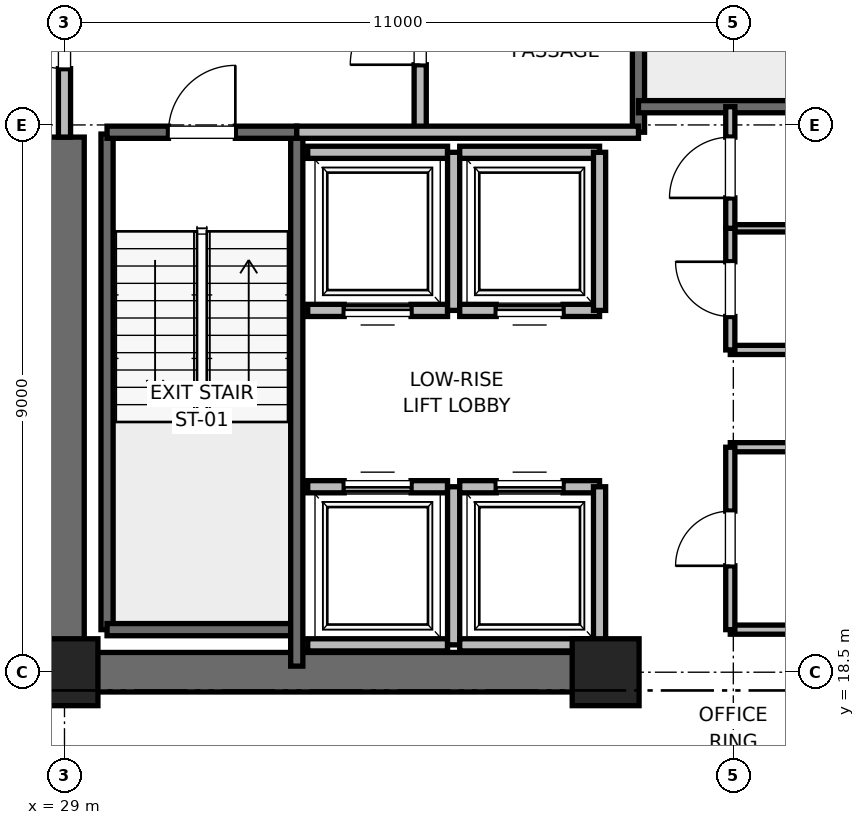
"""IFC4 building model, lengths in metres.
Left out: names, types, materials, properties, quantities, classifications, styles, units other than length and angle.
Written with IfcOpenShell. Run it as: python <this file> out.ifc"""

import sys

from ifc_helpers import new_model, si_unit, direction, frame, frame_2d, origin, origin_2d, place, context, subcontext, project, spatial, rectangle, extrude, element, fill, save


model = new_model("IFC4")
c1 = context("Model", 3, precision=1e-05, world=origin(), true_north=direction((0.0, 1.0)))
c2 = subcontext(c1, "Body", "Model", "MODEL_VIEW")
j1 = project(units=[si_unit("LENGTHUNIT", "METRE"), si_unit("PLANEANGLEUNIT", "RADIAN")], contexts=[c1])
p1 = place(None, origin())
s1 = spatial("IfcSite", under=j1, at=p1, CompositionType="ELEMENT")
p2 = place(p1, origin())
s2 = spatial("IfcBuilding", under=s1, at=p2, CompositionType="ELEMENT")
p3 = place(p2, frame((0.0, 0.0, 51.6)))
s3 = spatial("IfcBuildingStorey", under=s2, at=p3, CompositionType="ELEMENT", Elevation=51.6)
for number, where, z_axis, x_axis in (
    (1, (29.0, 18.5, 0.0), (0.0, 0.0, 1.0), (1.0, 0.0, 0.0)),
    (2, (37.9, 18.5, 0.0), (0.0, 0.0, 1.0), (1.0, 0.0, 0.0)),
):
    element("IfcColumn", number, at=place(p3, frame(where, z_axis=z_axis, x_axis=x_axis)), inside=s3, PredefinedType="PILASTER", context=c2, shape_type="SweptSolid", body=[
        extrude(rectangle(XDim=1.1, YDim=1.1, at=origin_2d()), origin(), (0.0, 0.0, 1.0), 4.0),
    ])
p4 = place(p3, frame((29.0, 18.5, 0.0), z_axis=(0.0, 0.0, 1.0), x_axis=(1.0, 0.0, 0.0)))
e3 = element("IfcWall", 3, at=p4, inside=s3, PredefinedType="SHEAR", context=c2, shape_type="SweptSolid", body=[
    extrude(rectangle(XDim=9.2, YDim=0.65, at=frame_2d((4.6, 0.0))), origin(), (0.0, 0.0, 1.0), 3.76),
])
p5 = place(p3, frame((29.0, 18.5, 0.0), z_axis=(0.0, 0.0, 1.0), x_axis=(0.0, 1.0, 0.0)))
e4 = element("IfcWall", 4, at=p5, inside=s3, PredefinedType="SHEAR", context=c2, shape_type="SweptSolid", body=[
    extrude(rectangle(XDim=8.8, YDim=0.65, at=frame_2d((4.4, 0.0))), origin(), (0.0, 0.0, 1.0), 3.76),
])
p6 = place(p3, frame((29.7, 19.2, 0.0), z_axis=(0.0, 0.0, 1.0), x_axis=(0.0, 1.0, 0.0)))
e5 = element("IfcWall", 5, at=p6, inside=s3, PredefinedType="SOLIDWALL", context=c2, shape_type="SweptSolid", body=[
    extrude(rectangle(XDim=8.15, YDim=0.2, at=frame_2d((4.075, 0.0))), origin(), (0.0, 0.0, 1.0), 3.76),
])
p7 = place(p3, frame((29.7, 19.2, 0.0), z_axis=(0.0, 0.0, 1.0), x_axis=(1.0, 0.0, 0.0)))
e6 = element("IfcWall", 6, at=p7, inside=s3, PredefinedType="SOLIDWALL", context=c2, shape_type="SweptSolid", body=[
    extrude(rectangle(XDim=3.12, YDim=0.2, at=frame_2d((1.56, 0.0))), origin(), (0.0, 0.0, 1.0), 3.76),
])
p8 = place(p3, frame((32.82, 18.6, 0.0), z_axis=(0.0, 0.0, 1.0), x_axis=(0.0, 1.0, 0.0)))
e7 = element("IfcWall", 7, at=p8, inside=s3, PredefinedType="SOLIDWALL", context=c2, shape_type="SweptSolid", body=[
    extrude(rectangle(XDim=8.78, YDim=0.2, at=frame_2d((4.39, 0.0))), origin(), (0.0, 0.0, 1.0), 3.76),
])
p9 = place(p3, frame((29.7, 27.38, 0.0), z_axis=(0.0, 0.0, 1.0), x_axis=(1.0, 0.0, 0.0)))
e8 = element("IfcWall", 8, at=p9, inside=s3, PredefinedType="SOLIDWALL", context=c2, shape_type="SweptSolid", body=[
    extrude(rectangle(XDim=3.12, YDim=0.2, at=frame_2d((1.56, 0.0))), origin(), (0.0, 0.0, 1.0), 3.76),
])
p10 = place(p9, frame((1.01, 0.0, 0.0)))
e9 = element("IfcOpeningElement", 9, at=p10, cuts=e8, PredefinedType="OPENING", context=c2, shape_type="SweptSolid", body=[
    extrude(rectangle(XDim=1.1, YDim=2.15, at=frame_2d((0.55, 1.075))), frame((0.0, 0.1, 0.0), z_axis=(0.0, -1.0, 0.0), x_axis=(1.0, 0.0, 0.0)), (0.0, 0.0, 1.0), 0.2),
])
p11 = place(p3, frame((38.44, 27.38, 0.0), z_axis=(0.0, 0.0, 1.0), x_axis=(0.0, 1.0, 0.0)))
e10 = element("IfcWall", 10, at=p11, inside=s3, PredefinedType="SOLIDWALL", context=c2, shape_type="SweptSolid", body=[
    extrude(rectangle(XDim=8.87, YDim=0.2, at=frame_2d((4.435, 0.0))), origin(), (0.0, 0.0, 1.0), 3.76),
])
p12 = place(p3, frame((38.44, 27.8, 0.0), z_axis=(0.0, 0.0, 1.0), x_axis=(1.0, 0.0, 0.0)))
e11 = element("IfcWall", 11, at=p12, inside=s3, PredefinedType="SOLIDWALL", context=c2, shape_type="SweptSolid", body=[
    extrude(rectangle(XDim=3.32, YDim=0.2, at=frame_2d((1.66, 0.0))), origin(), (0.0, 0.0, 1.0), 3.76),
])
p13 = place(p3, frame((34.85, 27.38, 0.0), z_axis=(0.0, 0.0, 1.0), x_axis=(0.0, 1.0, 0.0)))
e12 = element("IfcWall", 12, at=p13, inside=s3, PredefinedType="PARTITIONING", context=c2, shape_type="SweptSolid", body=[
    extrude(rectangle(XDim=3.37, YDim=0.2, at=frame_2d((1.685, 0.0))), origin(), (0.0, 0.0, 1.0), 3.76),
])
p14 = place(p13, frame((1.11, 0.0, 0.0)))
e13 = element("IfcOpeningElement", 13, at=p14, cuts=e12, PredefinedType="OPENING", context=c2, shape_type="SweptSolid", body=[
    extrude(rectangle(XDim=1.15, YDim=2.2, at=frame_2d((0.575, 1.1))), frame((0.0, 0.1, 0.0), z_axis=(0.0, -1.0, 0.0), x_axis=(1.0, 0.0, 0.0)), (0.0, 0.0, 1.0), 0.2),
])
p15 = place(p3, frame((29.0, 27.3, 0.0), z_axis=(0.0, 0.0, 1.0), x_axis=(0.0, 1.0, 0.0)))
e14 = element("IfcWall", 14, at=p15, inside=s3, PredefinedType="PARTITIONING", context=c2, shape_type="SweptSolid", body=[
    extrude(rectangle(XDim=3.4, YDim=0.2, at=frame_2d((1.7, 0.0))), origin(), (0.0, 0.0, 1.0), 2.54),
])
p16 = place(p15, frame((1.125, 0.0, 0.0)))
e15 = element("IfcOpeningElement", 15, at=p16, cuts=e14, PredefinedType="OPENING", context=c2, shape_type="SweptSolid", body=[
    extrude(rectangle(XDim=1.15, YDim=2.2, at=frame_2d((0.575, 1.1))), frame((0.0, 0.1, 0.0), z_axis=(0.0, -1.0, 0.0), x_axis=(1.0, 0.0, 0.0)), (0.0, 0.0, 1.0), 0.2),
])
p17 = place(p3, frame((32.82, 27.38, 0.0), z_axis=(0.0, 0.0, 1.0), x_axis=(1.0, 0.0, 0.0)))
e16 = element("IfcWall", 16, at=p17, inside=s3, PredefinedType="PARTITIONING", context=c2, shape_type="SweptSolid", body=[
    extrude(rectangle(XDim=5.62, YDim=0.2, at=frame_2d((2.81, 0.0))), origin(), (0.0, 0.0, 1.0), 3.76),
])
p18 = place(p3, frame((33.0, 18.95, 0.0), z_axis=(0.0, 0.0, 1.0), x_axis=(1.0, 0.0, 0.0)))
e17 = element("IfcWall", 17, at=p18, inside=s3, PredefinedType="SOLIDWALL", context=c2, shape_type="SweptSolid", body=[
    extrude(rectangle(XDim=2.3, YDim=0.2, at=frame_2d((1.15, 0.0))), origin(), (0.0, 0.0, 1.0), 3.76),
])
p19 = place(p3, frame((35.3, 21.55, 0.0), z_axis=(0.0, 0.0, 1.0), x_axis=(-1.0, 0.0, 0.0)))
e18 = element("IfcWall", 18, at=p19, inside=s3, PredefinedType="SOLIDWALL", context=c2, shape_type="SweptSolid", body=[
    extrude(rectangle(XDim=2.3, YDim=0.2, at=frame_2d((1.15, 0.0))), origin(), (0.0, 0.0, 1.0), 3.76),
])
p20 = place(p19, frame((0.6, 0.0, 0.0)))
e19 = element("IfcOpeningElement", 19, at=p20, cuts=e18, PredefinedType="OPENING", context=c2, shape_type="SweptSolid", body=[
    extrude(rectangle(XDim=1.1, YDim=2.2, at=frame_2d((0.55, 1.1))), frame((0.0, 0.1, 0.0), z_axis=(0.0, -1.0, 0.0), x_axis=(1.0, 0.0, 0.0)), (0.0, 0.0, 1.0), 0.2),
])
p21 = place(p3, frame((35.4, 18.95, 0.0), z_axis=(0.0, 0.0, 1.0), x_axis=(0.0, 1.0, 0.0)))
e20 = element("IfcWall", 20, at=p21, inside=s3, PredefinedType="SOLIDWALL", context=c2, shape_type="SweptSolid", body=[
    extrude(rectangle(XDim=2.6, YDim=0.2, at=frame_2d((1.3, 0.0))), origin(), (0.0, 0.0, 1.0), 3.76),
])
p22 = place(p3, frame((35.5, 18.95, 0.0), z_axis=(0.0, 0.0, 1.0), x_axis=(1.0, 0.0, 0.0)))
e21 = element("IfcWall", 21, at=p22, inside=s3, PredefinedType="SOLIDWALL", context=c2, shape_type="SweptSolid", body=[
    extrude(rectangle(XDim=2.3, YDim=0.2, at=frame_2d((1.15, 0.0))), origin(), (0.0, 0.0, 1.0), 2.54),
])
p23 = place(p3, frame((37.8, 21.55, 0.0), z_axis=(0.0, 0.0, 1.0), x_axis=(-1.0, 0.0, 0.0)))
e22 = element("IfcWall", 22, at=p23, inside=s3, PredefinedType="SOLIDWALL", context=c2, shape_type="SweptSolid", body=[
    extrude(rectangle(XDim=2.3, YDim=0.2, at=frame_2d((1.15, 0.0))), origin(), (0.0, 0.0, 1.0), 3.76),
])
p24 = place(p23, frame((0.6, 0.0, 0.0)))
e23 = element("IfcOpeningElement", 23, at=p24, cuts=e22, PredefinedType="OPENING", context=c2, shape_type="SweptSolid", body=[
    extrude(rectangle(XDim=1.1, YDim=2.2, at=frame_2d((0.55, 1.1))), frame((0.0, 0.1, 0.0), z_axis=(0.0, -1.0, 0.0), x_axis=(1.0, 0.0, 0.0)), (0.0, 0.0, 1.0), 0.2),
])
p25 = place(p3, frame((37.8, 18.95, 0.0), z_axis=(0.0, 0.0, 1.0), x_axis=(0.0, 1.0, 0.0)))
e24 = element("IfcWall", 24, at=p25, inside=s3, PredefinedType="SOLIDWALL", context=c2, shape_type="SweptSolid", body=[
    extrude(rectangle(XDim=2.6, YDim=0.2, at=frame_2d((1.3, 0.0))), origin(), (0.0, 0.0, 1.0), 2.54),
])
p26 = place(p3, frame((33.0, 24.45, 0.0), z_axis=(0.0, 0.0, 1.0), x_axis=(1.0, 0.0, 0.0)))
e25 = element("IfcWall", 25, at=p26, inside=s3, PredefinedType="SOLIDWALL", context=c2, shape_type="SweptSolid", body=[
    extrude(rectangle(XDim=2.3, YDim=0.2, at=frame_2d((1.15, 0.0))), origin(), (0.0, 0.0, 1.0), 3.76),
])
p27 = place(p26, frame((0.6, 0.0, 0.0)))
e26 = element("IfcOpeningElement", 26, at=p27, cuts=e25, PredefinedType="OPENING", context=c2, shape_type="SweptSolid", body=[
    extrude(rectangle(XDim=1.1, YDim=2.2, at=frame_2d((0.55, 1.1))), frame((0.0, 0.1, 0.0), z_axis=(0.0, -1.0, 0.0), x_axis=(1.0, 0.0, 0.0)), (0.0, 0.0, 1.0), 0.2),
])
p28 = place(p3, frame((35.3, 27.05, 0.0), z_axis=(0.0, 0.0, 1.0), x_axis=(-1.0, 0.0, 0.0)))
e27 = element("IfcWall", 27, at=p28, inside=s3, PredefinedType="SOLIDWALL", context=c2, shape_type="SweptSolid", body=[
    extrude(rectangle(XDim=2.3, YDim=0.2, at=frame_2d((1.15, 0.0))), origin(), (0.0, 0.0, 1.0), 3.76),
])
p29 = place(p3, frame((35.4, 24.45, 0.0), z_axis=(0.0, 0.0, 1.0), x_axis=(0.0, 1.0, 0.0)))
e28 = element("IfcWall", 28, at=p29, inside=s3, PredefinedType="SOLIDWALL", context=c2, shape_type="SweptSolid", body=[
    extrude(rectangle(XDim=2.6, YDim=0.2, at=frame_2d((1.3, 0.0))), origin(), (0.0, 0.0, 1.0), 3.76),
])
p30 = place(p3, frame((35.5, 24.45, 0.0), z_axis=(0.0, 0.0, 1.0), x_axis=(1.0, 0.0, 0.0)))
e29 = element("IfcWall", 29, at=p30, inside=s3, PredefinedType="SOLIDWALL", context=c2, shape_type="SweptSolid", body=[
    extrude(rectangle(XDim=2.3, YDim=0.2, at=frame_2d((1.15, 0.0))), origin(), (0.0, 0.0, 1.0), 3.76),
])
p31 = place(p30, frame((0.6, 0.0, 0.0)))
e30 = element("IfcOpeningElement", 30, at=p31, cuts=e29, PredefinedType="OPENING", context=c2, shape_type="SweptSolid", body=[
    extrude(rectangle(XDim=1.1, YDim=2.2, at=frame_2d((0.55, 1.1))), frame((0.0, 0.1, 0.0), z_axis=(0.0, -1.0, 0.0), x_axis=(1.0, 0.0, 0.0)), (0.0, 0.0, 1.0), 0.2),
])
p32 = place(p3, frame((37.8, 27.05, 0.0), z_axis=(0.0, 0.0, 1.0), x_axis=(-1.0, 0.0, 0.0)))
e31 = element("IfcWall", 31, at=p32, inside=s3, PredefinedType="SOLIDWALL", context=c2, shape_type="SweptSolid", body=[
    extrude(rectangle(XDim=2.3, YDim=0.2, at=frame_2d((1.15, 0.0))), origin(), (0.0, 0.0, 1.0), 3.76),
])
p33 = place(p3, frame((37.8, 24.45, 0.0), z_axis=(0.0, 0.0, 1.0), x_axis=(0.0, 1.0, 0.0)))
e32 = element("IfcWall", 32, at=p33, inside=s3, PredefinedType="SOLIDWALL", context=c2, shape_type="SweptSolid", body=[
    extrude(rectangle(XDim=2.6, YDim=0.2, at=frame_2d((1.3, 0.0))), origin(), (0.0, 0.0, 1.0), 3.76),
])
for number, where, z_axis, x_axis in (
    (33, (39.95, 19.2, 0.0), (0.0, 0.0, 1.0), (1.0, 0.0, 0.0)),
    (34, (39.95, 22.2, 0.0), (0.0, 0.0, 1.0), (1.0, 0.0, 0.0)),
    (35, (39.95, 23.8, 0.0), (0.0, 0.0, 1.0), (1.0, 0.0, 0.0)),
):
    element("IfcWall", number, at=place(p3, frame(where, z_axis=z_axis, x_axis=x_axis)), inside=s3, PredefinedType="PARTITIONING", context=c2, shape_type="SweptSolid", body=[
        extrude(rectangle(XDim=1.81, YDim=0.15, at=frame_2d((0.905, 0.0))), origin(), (0.0, 0.0, 1.0), 2.85),
    ])
p34 = place(p3, frame((39.95, 25.8, 0.0), z_axis=(0.0, 0.0, 1.0), x_axis=(1.0, 0.0, 0.0)))
e36 = element("IfcWall", 36, at=p34, inside=s3, PredefinedType="PARTITIONING", context=c2, shape_type="SweptSolid", body=[
    extrude(rectangle(XDim=1.81, YDim=0.12, at=frame_2d((0.905, 0.0))), origin(), (0.0, 0.0, 1.0), 2.85),
])
p35 = place(p3, frame((39.95, 19.2, 0.0), z_axis=(0.0, 0.0, 1.0), x_axis=(0.0, 1.0, 0.0)))
e37 = element("IfcWall", 37, at=p35, inside=s3, PredefinedType="PARTITIONING", context=c2, shape_type="SweptSolid", body=[
    extrude(rectangle(XDim=3.0, YDim=0.15, at=frame_2d((1.5, 0.0))), origin(), (0.0, 0.0, 1.0), 2.85),
])
p36 = place(p35, frame((1.05, 0.0, 0.0)))
e38 = element("IfcOpeningElement", 38, at=p36, cuts=e37, PredefinedType="OPENING", context=c2, shape_type="SweptSolid", body=[
    extrude(rectangle(XDim=0.9, YDim=2.1, at=frame_2d((0.45, 1.05))), frame((0.0, 0.075, 0.0), z_axis=(0.0, -1.0, 0.0), x_axis=(1.0, 0.0, 0.0)), (0.0, 0.0, 1.0), 0.15),
])
p37 = place(p3, frame((39.95, 23.8, 0.0), z_axis=(0.0, 0.0, 1.0), x_axis=(0.0, 1.0, 0.0)))
e39 = element("IfcWall", 39, at=p37, inside=s3, PredefinedType="PARTITIONING", context=c2, shape_type="SweptSolid", body=[
    extrude(rectangle(XDim=2.0, YDim=0.15, at=frame_2d((1.0, 0.0))), origin(), (0.0, 0.0, 1.0), 2.85),
])
p38 = place(p37, frame((0.55, 0.0, 0.0)))
e40 = element("IfcOpeningElement", 40, at=p38, cuts=e39, PredefinedType="OPENING", context=c2, shape_type="SweptSolid", body=[
    extrude(rectangle(XDim=0.9, YDim=2.1, at=frame_2d((0.45, 1.05))), frame((0.0, 0.075, 0.0), z_axis=(0.0, -1.0, 0.0), x_axis=(1.0, 0.0, 0.0)), (0.0, 0.0, 1.0), 0.15),
])
p39 = place(p3, frame((39.95, 25.8, 0.0), z_axis=(0.0, 0.0, 1.0), x_axis=(0.0, 1.0, 0.0)))
e41 = element("IfcWall", 41, at=p39, inside=s3, PredefinedType="PARTITIONING", context=c2, shape_type="SweptSolid", body=[
    extrude(rectangle(XDim=2.0, YDim=0.15, at=frame_2d((1.0, 0.0))), origin(), (0.0, 0.0, 1.0), 2.85),
])
p40 = place(p39, frame((0.5, 0.0, 0.0)))
e42 = element("IfcOpeningElement", 42, at=p40, cuts=e41, PredefinedType="OPENING", context=c2, shape_type="SweptSolid", body=[
    extrude(rectangle(XDim=1.0, YDim=2.15, at=frame_2d((0.5, 1.075))), frame((0.0, 0.075, 0.0), z_axis=(0.0, -1.0, 0.0), x_axis=(1.0, 0.0, 0.0)), (0.0, 0.0, 1.0), 0.15),
])
p41 = place(p10, origin())
e43 = element("IfcDoor", 43, at=p41, inside=s3, OperationType="SINGLE_SWING_RIGHT", PredefinedType="DOOR", context=c2, shape_type="SweptSolid", body=[
    extrude(rectangle(XDim=1.1, YDim=2.15, at=frame_2d((0.55, 1.075))), frame((0.0, 0.025, 0.0), z_axis=(0.0, -1.0, 0.0), x_axis=(1.0, 0.0, 0.0)), (0.0, 0.0, 1.0), 0.05),
])
fill(e9, e43)
p42 = place(p14, origin())
e44 = element("IfcDoor", 44, at=p42, inside=s3, OperationType="SINGLE_SWING_LEFT", PredefinedType="DOOR", context=c2, shape_type="SweptSolid", body=[
    extrude(rectangle(XDim=1.15, YDim=2.2, at=frame_2d((0.575, 1.1))), frame((0.0, 0.025, 0.0), z_axis=(0.0, -1.0, 0.0), x_axis=(1.0, 0.0, 0.0)), (0.0, 0.0, 1.0), 0.05),
])
fill(e13, e44)
p43 = place(p16, origin())
e45 = element("IfcDoor", 45, at=p43, inside=s3, OperationType="SINGLE_SWING_RIGHT", PredefinedType="DOOR", context=c2, shape_type="SweptSolid", body=[
    extrude(rectangle(XDim=1.15, YDim=2.2, at=frame_2d((0.575, 1.1))), frame((0.0, 0.025, 0.0), z_axis=(0.0, -1.0, 0.0), x_axis=(1.0, 0.0, 0.0)), (0.0, 0.0, 1.0), 0.05),
])
fill(e15, e45)
p44 = place(p20, origin())
e46 = element("IfcDoor", 46, at=p44, inside=s3, OperationType="SLIDING_TO_RIGHT", PredefinedType="DOOR", context=c2, shape_type="SweptSolid", body=[
    extrude(rectangle(XDim=1.1, YDim=2.2, at=frame_2d((0.55, 1.1))), frame((0.0, 0.025, 0.0), z_axis=(0.0, -1.0, 0.0), x_axis=(1.0, 0.0, 0.0)), (0.0, 0.0, 1.0), 0.05),
])
fill(e19, e46)
p45 = place(p24, origin())
e47 = element("IfcDoor", 47, at=p45, inside=s3, OperationType="SLIDING_TO_RIGHT", PredefinedType="DOOR", context=c2, shape_type="SweptSolid", body=[
    extrude(rectangle(XDim=1.1, YDim=2.2, at=frame_2d((0.55, 1.1))), frame((0.0, 0.025, 0.0), z_axis=(0.0, -1.0, 0.0), x_axis=(1.0, 0.0, 0.0)), (0.0, 0.0, 1.0), 0.05),
])
fill(e23, e47)
p46 = place(p27, origin())
e48 = element("IfcDoor", 48, at=p46, inside=s3, OperationType="SLIDING_TO_RIGHT", PredefinedType="DOOR", context=c2, shape_type="SweptSolid", body=[
    extrude(rectangle(XDim=1.1, YDim=2.2, at=frame_2d((0.55, 1.1))), frame((0.0, 0.025, 0.0), z_axis=(0.0, -1.0, 0.0), x_axis=(1.0, 0.0, 0.0)), (0.0, 0.0, 1.0), 0.05),
])
fill(e26, e48)
p47 = place(p31, origin())
e49 = element("IfcDoor", 49, at=p47, inside=s3, OperationType="SLIDING_TO_RIGHT", PredefinedType="DOOR", context=c2, shape_type="SweptSolid", body=[
    extrude(rectangle(XDim=1.1, YDim=2.2, at=frame_2d((0.55, 1.1))), frame((0.0, 0.025, 0.0), z_axis=(0.0, -1.0, 0.0), x_axis=(1.0, 0.0, 0.0)), (0.0, 0.0, 1.0), 0.05),
])
fill(e30, e49)
p48 = place(p36, origin())
e50 = element("IfcDoor", 50, at=p48, inside=s3, OperationType="SINGLE_SWING_LEFT", PredefinedType="DOOR", context=c2, shape_type="SweptSolid", body=[
    extrude(rectangle(XDim=0.9, YDim=2.1, at=frame_2d((0.45, 1.05))), frame((0.0, 0.025, 0.0), z_axis=(0.0, -1.0, 0.0), x_axis=(1.0, 0.0, 0.0)), (0.0, 0.0, 1.0), 0.05),
])
fill(e38, e50)
p49 = place(p38, origin())
e51 = element("IfcDoor", 51, at=p49, inside=s3, OperationType="SINGLE_SWING_RIGHT", PredefinedType="DOOR", context=c2, shape_type="SweptSolid", body=[
    extrude(rectangle(XDim=0.9, YDim=2.1, at=frame_2d((0.45, 1.05))), frame((0.0, 0.025, 0.0), z_axis=(0.0, -1.0, 0.0), x_axis=(1.0, 0.0, 0.0)), (0.0, 0.0, 1.0), 0.05),
])
fill(e40, e51)
p50 = place(p40, origin())
e52 = element("IfcDoor", 52, at=p50, inside=s3, OperationType="SINGLE_SWING_LEFT", PredefinedType="DOOR", context=c2, shape_type="SweptSolid", body=[
    extrude(rectangle(XDim=1.0, YDim=2.15, at=frame_2d((0.5, 1.075))), frame((0.0, 0.025, 0.0), z_axis=(0.0, -1.0, 0.0), x_axis=(1.0, 0.0, 0.0)), (0.0, 0.0, 1.0), 0.05),
])
fill(e42, e52)
save(model, sys.argv[1])
